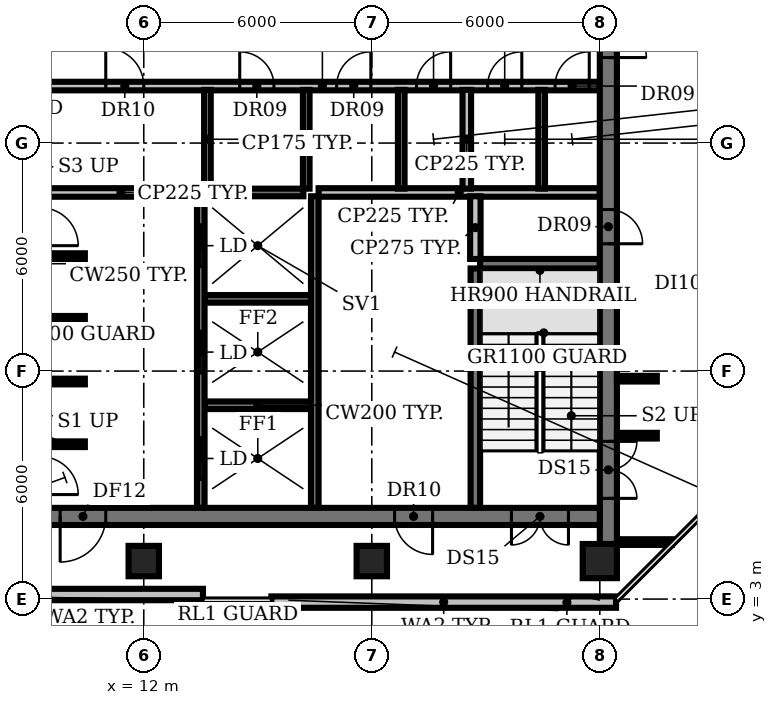
"""IFC4 building model, lengths in metres.
Left out: names, types, materials, properties, quantities, classifications, styles, units other than length and angle.
Written with IfcOpenShell. Run it as: python <this file> out.ifc"""

import sys

from ifc_helpers import new_model, si_unit, direction, frame, frame_2d, origin, origin_2d, place, context, subcontext, project, spatial, rectangle, circle, extrude, element, fill, save


model = new_model("IFC4")
c1 = context("Model", 3, precision=1e-05, world=origin(), true_north=direction((0.0, 1.0)))
c2 = subcontext(c1, "Body", "Model", "MODEL_VIEW")
j1 = project(units=[si_unit("LENGTHUNIT", "METRE"), si_unit("PLANEANGLEUNIT", "RADIAN")], contexts=[c1])
p1 = place(None, origin())
s1 = spatial("IfcSite", under=j1, at=p1, CompositionType="ELEMENT")
p2 = place(p1, origin())
s2 = spatial("IfcBuilding", under=s1, at=p2, CompositionType="ELEMENT")
p3 = place(p2, frame((0.0, 0.0, 239.0)))
s3 = spatial("IfcBuildingStorey", under=s2, at=p3, CompositionType="ELEMENT", Elevation=239.0)
for number, where, z_axis, x_axis in (
    (1, (12.0, 4.0, 0.0), (0.0, 0.0, 1.0), (1.0, 0.0, 0.0)),
    (2, (18.0, 4.0, 0.0), (0.0, 0.0, 1.0), (1.0, 0.0, 0.0)),
):
    element("IfcColumn", number, at=place(p3, frame(where, z_axis=z_axis, x_axis=x_axis)), inside=s3, PredefinedType="COLUMN", context=c2, shape_type="SweptSolid", body=[
        extrude(rectangle(XDim=0.8, YDim=0.8, at=origin_2d()), origin(), (0.0, 0.0, 1.0), 3.85),
    ])
p4 = place(p3, frame((24.0, 4.0, 0.0), z_axis=(0.0, 0.0, 1.0), x_axis=(1.0, 0.0, 0.0)))
e3 = element("IfcColumn", 3, at=p4, inside=s3, PredefinedType="COLUMN", context=c2, shape_type="SweptSolid", body=[
    extrude(circle(Radius=0.45, at=origin_2d()), origin(), (0.0, 0.0, 1.0), 3.85),
])
p5 = place(p3, frame((4.489, 3.12, 0.0), z_axis=(0.0, 0.0, 1.0), x_axis=(1.0, 0.0, 0.0)))
e4 = element("IfcWall", 4, at=p5, inside=s3, PredefinedType="SOLIDWALL", context=c2, shape_type="SweptSolid", body=[
    extrude(rectangle(XDim=9.069, YDim=0.3, at=frame_2d((4.535, 0.0))), origin(), (0.0, 0.0, 1.0), 3.85),
])
p6 = place(p3, frame((15.358, 2.92, 0.0), z_axis=(0.0, 0.0, 1.0), x_axis=(1.0, 0.0, 0.0)))
e5 = element("IfcWall", 5, at=p6, inside=s3, PredefinedType="SOLIDWALL", context=c2, shape_type="SweptSolid", body=[
    extrude(rectangle(XDim=9.069, YDim=0.3, at=frame_2d((4.534, 0.0))), origin(), (0.0, 0.0, 1.0), 3.85),
])
p7 = place(p3, frame((9.4, 7.075, 0.0), z_axis=(0.0, 0.0, 1.0), x_axis=(1.0, 0.0, 0.0)))
e6 = element("IfcWall", 6, at=p7, inside=s3, PredefinedType="SHEAR", context=c2, shape_type="SweptSolid", body=[
    extrude(rectangle(XDim=1.05, YDim=0.15, at=frame_2d((0.525, 0.0))), origin(), (0.0, 0.0, 1.0), 3.85),
])
p8 = place(p3, frame((13.6, 8.1, 0.0), z_axis=(0.0, 0.0, 1.0), x_axis=(1.0, 0.0, 0.0)))
e7 = element("IfcWall", 7, at=p8, inside=s3, PredefinedType="SHEAR", context=c2, shape_type="SweptSolid", body=[
    extrude(rectangle(XDim=2.8, YDim=0.2, at=frame_2d((1.4, 0.0))), origin(), (0.0, 0.0, 1.0), 3.85),
])
for number, where, z_axis, x_axis in (
    (8, (9.4, 8.725, 0.0), (0.0, 0.0, 1.0), (1.0, 0.0, 0.0)),
    (9, (9.4, 10.375, 0.0), (0.0, 0.0, 1.0), (1.0, 0.0, 0.0)),
):
    element("IfcWall", number, at=place(p3, frame(where, z_axis=z_axis, x_axis=x_axis)), inside=s3, PredefinedType="SHEAR", context=c2, shape_type="SweptSolid", body=[
        extrude(rectangle(XDim=1.05, YDim=0.15, at=frame_2d((0.525, 0.0))), origin(), (0.0, 0.0, 1.0), 3.85),
    ])
p9 = place(p3, frame((13.6, 10.9, 0.0), z_axis=(0.0, 0.0, 1.0), x_axis=(1.0, 0.0, 0.0)))
e10 = element("IfcWall", 10, at=p9, inside=s3, PredefinedType="SHEAR", context=c2, shape_type="SweptSolid", body=[
    extrude(rectangle(XDim=2.8, YDim=0.2, at=frame_2d((1.4, 0.0))), origin(), (0.0, 0.0, 1.0), 3.85),
])
p10 = place(p3, frame((20.85, 11.825, 0.0), z_axis=(0.0, 0.0, 1.0), x_axis=(1.0, 0.0, 0.0)))
e11 = element("IfcWall", 11, at=p10, inside=s3, PredefinedType="SHEAR", context=c2, shape_type="SweptSolid", body=[
    extrude(rectangle(XDim=3.15, YDim=0.25, at=frame_2d((1.575, 0.0))), origin(), (0.0, 0.0, 1.0), 3.85),
])
p11 = place(p3, frame((9.4, 12.025, 0.0), z_axis=(0.0, 0.0, 1.0), x_axis=(1.0, 0.0, 0.0)))
e12 = element("IfcWall", 12, at=p11, inside=s3, PredefinedType="SHEAR", context=c2, shape_type="SweptSolid", body=[
    extrude(rectangle(XDim=1.05, YDim=0.15, at=frame_2d((0.525, 0.0))), origin(), (0.0, 0.0, 1.0), 3.85),
])
p12 = place(p3, frame((9.4, 13.7, 0.0), z_axis=(0.0, 0.0, 1.0), x_axis=(1.0, 0.0, 0.0)))
e13 = element("IfcWall", 13, at=p12, inside=s3, PredefinedType="PARTITIONING", context=c2, shape_type="SweptSolid", body=[
    extrude(rectangle(XDim=4.0, YDim=0.225, at=frame_2d((2.0, 0.0))), origin(), (0.0, 0.0, 1.0), 3.85),
])
p13 = place(p3, frame((13.75, 13.7, 0.0), z_axis=(0.0, 0.0, 1.0), x_axis=(1.0, 0.0, 0.0)))
e14 = element("IfcWall", 14, at=p13, inside=s3, PredefinedType="SHEAR", context=c2, shape_type="SweptSolid", body=[
    extrude(rectangle(XDim=2.45, YDim=0.2, at=frame_2d((1.225, 0.0))), origin(), (0.0, 0.0, 1.0), 3.85),
])
p14 = place(p3, frame((16.6, 13.7, 0.0), z_axis=(0.0, 0.0, 1.0), x_axis=(1.0, 0.0, 0.0)))
e15 = element("IfcWall", 15, at=p14, inside=s3, PredefinedType="PARTITIONING", context=c2, shape_type="SweptSolid", body=[
    extrude(rectangle(XDim=7.4, YDim=0.225, at=frame_2d((3.7, 0.0))), origin(), (0.0, 0.0, 1.0), 3.85),
])
p15 = place(p3, frame((9.4, 16.5, 0.0), z_axis=(0.0, 0.0, 1.0), x_axis=(1.0, 0.0, 0.0)))
e16 = element("IfcWall", 16, at=p15, inside=s3, PredefinedType="PARTITIONING", context=c2, shape_type="SweptSolid", body=[
    extrude(rectangle(XDim=14.6, YDim=0.225, at=frame_2d((7.3, 0.0))), origin(), (0.0, 0.0, 1.0), 3.85),
])
p16 = place(p15, frame((1.6, 0.0, 0.0)))
e17 = element("IfcOpeningElement", 17, at=p16, cuts=e16, PredefinedType="OPENING", context=c2, shape_type="SweptSolid", body=[
    extrude(rectangle(XDim=1.0, YDim=2.1, at=frame_2d((0.5, 1.05))), frame((0.0, 0.123, 0.0), z_axis=(0.0, -1.0, 0.0), x_axis=(1.0, 0.0, 0.0)), (0.0, 0.0, 1.0), 0.245),
])
p17 = place(p15, frame((5.125, 0.0, 0.0)))
e18 = element("IfcOpeningElement", 18, at=p17, cuts=e16, PredefinedType="OPENING", context=c2, shape_type="SweptSolid", body=[
    extrude(rectangle(XDim=0.9, YDim=2.1, at=frame_2d((0.45, 1.05))), frame((0.0, 0.123, 0.0), z_axis=(0.0, -1.0, 0.0), x_axis=(1.0, 0.0, 0.0)), (0.0, 0.0, 1.0), 0.245),
])
p18 = place(p15, frame((7.675, 0.0, 0.0)))
e19 = element("IfcOpeningElement", 19, at=p18, cuts=e16, PredefinedType="OPENING", context=c2, shape_type="SweptSolid", body=[
    extrude(rectangle(XDim=0.9, YDim=2.1, at=frame_2d((0.45, 1.05))), frame((0.0, 0.123, 0.0), z_axis=(0.0, -1.0, 0.0), x_axis=(1.0, 0.0, 0.0)), (0.0, 0.0, 1.0), 0.245),
])
p19 = place(p15, frame((9.775, 0.0, 0.0)))
e20 = element("IfcOpeningElement", 20, at=p19, cuts=e16, PredefinedType="OPENING", context=c2, shape_type="SweptSolid", body=[
    extrude(rectangle(XDim=0.9, YDim=2.1, at=frame_2d((0.45, 1.05))), frame((0.0, 0.123, 0.0), z_axis=(0.0, -1.0, 0.0), x_axis=(1.0, 0.0, 0.0)), (0.0, 0.0, 1.0), 0.245),
])
p20 = place(p15, frame((11.647, 0.0, 0.0)))
e21 = element("IfcOpeningElement", 21, at=p20, cuts=e16, PredefinedType="OPENING", context=c2, shape_type="SweptSolid", body=[
    extrude(rectangle(XDim=0.9, YDim=2.1, at=frame_2d((0.45, 1.05))), frame((0.0, 0.123, 0.0), z_axis=(0.0, -1.0, 0.0), x_axis=(1.0, 0.0, 0.0)), (0.0, 0.0, 1.0), 0.245),
])
p21 = place(p15, frame((13.423, 0.0, 0.0)))
e22 = element("IfcOpeningElement", 22, at=p21, cuts=e16, PredefinedType="OPENING", context=c2, shape_type="SweptSolid", body=[
    extrude(rectangle(XDim=0.9, YDim=2.1, at=frame_2d((0.45, 1.05))), frame((0.0, 0.123, 0.0), z_axis=(0.0, -1.0, 0.0), x_axis=(1.0, 0.0, 0.0)), (0.0, 0.0, 1.0), 0.245),
])
p22 = place(p3, frame((13.5, 5.4, 0.0), z_axis=(0.0, 0.0, 1.0), x_axis=(0.0, 1.0, 0.0)))
e23 = element("IfcWall", 23, at=p22, inside=s3, PredefinedType="SHEAR", context=c2, shape_type="SweptSolid", body=[
    extrude(rectangle(XDim=8.2, YDim=0.2, at=frame_2d((4.1, 0.0))), origin(), (0.0, 0.0, 1.0), 3.85),
])
p23 = place(p22, frame((0.75, 0.0, 0.0)))
e24 = element("IfcOpeningElement", 24, at=p23, cuts=e23, PredefinedType="OPENING", context=c2, shape_type="SweptSolid", body=[
    extrude(rectangle(XDim=1.1, YDim=2.1, at=frame_2d((0.55, 1.05))), frame((0.0, 0.11, 0.0), z_axis=(0.0, -1.0, 0.0), x_axis=(1.0, 0.0, 0.0)), (0.0, 0.0, 1.0), 0.22),
])
p24 = place(p22, frame((3.55, 0.0, 0.0)))
e25 = element("IfcOpeningElement", 25, at=p24, cuts=e23, PredefinedType="OPENING", context=c2, shape_type="SweptSolid", body=[
    extrude(rectangle(XDim=1.1, YDim=2.1, at=frame_2d((0.55, 1.05))), frame((0.0, 0.11, 0.0), z_axis=(0.0, -1.0, 0.0), x_axis=(1.0, 0.0, 0.0)), (0.0, 0.0, 1.0), 0.22),
])
p25 = place(p22, frame((6.35, 0.0, 0.0)))
e26 = element("IfcOpeningElement", 26, at=p25, cuts=e23, PredefinedType="OPENING", context=c2, shape_type="SweptSolid", body=[
    extrude(rectangle(XDim=1.1, YDim=2.1, at=frame_2d((0.55, 1.05))), frame((0.0, 0.11, 0.0), z_axis=(0.0, -1.0, 0.0), x_axis=(1.0, 0.0, 0.0)), (0.0, 0.0, 1.0), 0.22),
])
for number, where, z_axis, x_axis in (
    (27, (13.675, 13.8, 0.0), (0.0, 0.0, 1.0), (0.0, 1.0, 0.0)),
    (28, (16.275, 13.8, 0.0), (0.0, 0.0, 1.0), (0.0, 1.0, 0.0)),
):
    element("IfcWall", number, at=place(p3, frame(where, z_axis=z_axis, x_axis=x_axis)), inside=s3, PredefinedType="PARTITIONING", context=c2, shape_type="SweptSolid", body=[
        extrude(rectangle(XDim=2.6, YDim=0.175, at=frame_2d((1.3, 0.0))), origin(), (0.0, 0.0, 1.0), 3.85),
    ])
p26 = place(p3, frame((16.5, 5.4, 0.0), z_axis=(0.0, 0.0, 1.0), x_axis=(0.0, 1.0, 0.0)))
e29 = element("IfcWall", 29, at=p26, inside=s3, PredefinedType="SHEAR", context=c2, shape_type="SweptSolid", body=[
    extrude(rectangle(XDim=8.2, YDim=0.2, at=frame_2d((4.1, 0.0))), origin(), (0.0, 0.0, 1.0), 3.85),
])
p27 = place(p3, frame((18.775, 13.8, 0.0), z_axis=(0.0, 0.0, 1.0), x_axis=(0.0, 1.0, 0.0)))
e30 = element("IfcWall", 30, at=p27, inside=s3, PredefinedType="PARTITIONING", context=c2, shape_type="SweptSolid", body=[
    extrude(rectangle(XDim=2.6, YDim=0.175, at=frame_2d((1.3, 0.0))), origin(), (0.0, 0.0, 1.0), 3.85),
])
p28 = place(p3, frame((20.5, 13.8, 0.0), z_axis=(0.0, 0.0, 1.0), x_axis=(0.0, 1.0, 0.0)))
e31 = element("IfcWall", 31, at=p28, inside=s3, PredefinedType="PARTITIONING", context=c2, shape_type="SweptSolid", body=[
    extrude(rectangle(XDim=2.6, YDim=0.225, at=frame_2d((1.3, 0.0))), origin(), (0.0, 0.0, 1.0), 3.85),
])
p29 = place(p3, frame((20.725, 5.4, 0.0), z_axis=(0.0, 0.0, 1.0), x_axis=(0.0, 1.0, 0.0)))
e32 = element("IfcWall", 32, at=p29, inside=s3, PredefinedType="SHEAR", context=c2, shape_type="SweptSolid", body=[
    extrude(rectangle(XDim=6.3, YDim=0.25, at=frame_2d((3.15, 0.0))), origin(), (0.0, 0.0, 1.0), 3.85),
])
p30 = place(p3, frame((20.725, 11.95, 0.0), z_axis=(0.0, 0.0, 1.0), x_axis=(0.0, 1.0, 0.0)))
e33 = element("IfcWall", 33, at=p30, inside=s3, PredefinedType="PARTITIONING", context=c2, shape_type="SweptSolid", body=[
    extrude(rectangle(XDim=1.65, YDim=0.275, at=frame_2d((0.825, 0.0))), origin(), (0.0, 0.0, 1.0), 3.85),
])
p31 = place(p3, frame((22.47, 13.8, 0.0), z_axis=(0.0, 0.0, 1.0), x_axis=(0.0, 1.0, 0.0)))
e34 = element("IfcWall", 34, at=p31, inside=s3, PredefinedType="PARTITIONING", context=c2, shape_type="SweptSolid", body=[
    extrude(rectangle(XDim=2.6, YDim=0.175, at=frame_2d((1.3, 0.0))), origin(), (0.0, 0.0, 1.0), 3.85),
])
p32 = place(p3, frame((24.225, 25.25, 0.0), z_axis=(0.0, 0.0, 1.0), x_axis=(0.0, -1.0, 0.0)))
e35 = element("IfcWall", 35, at=p32, inside=s3, PredefinedType="SHEAR", context=c2, shape_type="SweptSolid", body=[
    extrude(rectangle(XDim=20.83, YDim=0.45, at=frame_2d((10.415, 0.0))), origin(), (0.0, 0.0, 1.0), 3.85),
])
p33 = place(p32, frame((18.1, 0.0, 0.0)))
e36 = element("IfcOpeningElement", 36, at=p33, cuts=e35, PredefinedType="OPENING", context=c2, shape_type="SweptSolid", body=[
    extrude(rectangle(XDim=1.5, YDim=2.1, at=frame_2d((0.75, 1.05))), frame((0.0, 0.235, 0.0), z_axis=(0.0, -1.0, 0.0), x_axis=(1.0, 0.0, 0.0)), (0.0, 0.0, 1.0), 0.47),
])
p34 = place(p32, frame((12.0, 0.0, 0.0)))
e37 = element("IfcOpeningElement", 37, at=p34, cuts=e35, PredefinedType="OPENING", context=c2, shape_type="SweptSolid", body=[
    extrude(rectangle(XDim=0.9, YDim=2.1, at=frame_2d((0.45, 1.05))), frame((0.0, 0.235, 0.0), z_axis=(0.0, -1.0, 0.0), x_axis=(1.0, 0.0, 0.0)), (0.0, 0.0, 1.0), 0.47),
])
p35 = place(p32, frame((6.0, 0.0, 0.0)))
e38 = element("IfcOpeningElement", 38, at=p35, cuts=e35, PredefinedType="OPENING", context=c2, shape_type="SweptSolid", body=[
    extrude(rectangle(XDim=2.0, YDim=2.1, at=frame_2d((1.0, 1.05))), frame((0.0, 0.235, 0.0), z_axis=(0.0, -1.0, 0.0), x_axis=(1.0, 0.0, 0.0)), (0.0, 0.0, 1.0), 0.47),
])
p36 = place(p3, frame((24.0, 5.175, 0.0), z_axis=(0.0, 0.0, 1.0), x_axis=(-1.0, 0.0, 0.0)))
e39 = element("IfcWall", 39, at=p36, inside=s3, PredefinedType="SHEAR", context=c2, shape_type="SweptSolid", body=[
    extrude(rectangle(XDim=18.0, YDim=0.45, at=frame_2d((9.0, 0.0))), origin(), (0.0, 0.0, 1.0), 3.85),
])
p37 = place(p36, frame((0.825, 0.0, 0.0)))
e40 = element("IfcOpeningElement", 40, at=p37, cuts=e39, PredefinedType="OPENING", context=c2, shape_type="SweptSolid", body=[
    extrude(rectangle(XDim=1.5, YDim=2.1, at=frame_2d((0.75, 1.05))), frame((0.0, 0.235, 0.0), z_axis=(0.0, -1.0, 0.0), x_axis=(1.0, 0.0, 0.0)), (0.0, 0.0, 1.0), 0.47),
])
p38 = place(p36, frame((15.675, 0.0, 0.0)))
e41 = element("IfcOpeningElement", 41, at=p38, cuts=e39, PredefinedType="OPENING", context=c2, shape_type="SweptSolid", body=[
    extrude(rectangle(XDim=1.5, YDim=2.1, at=frame_2d((0.75, 1.05))), frame((0.0, 0.235, 0.0), z_axis=(0.0, -1.0, 0.0), x_axis=(1.0, 0.0, 0.0)), (0.0, 0.0, 1.0), 0.47),
])
p39 = place(p36, frame((13.0, 0.0, 0.0)))
e42 = element("IfcOpeningElement", 42, at=p39, cuts=e39, PredefinedType="OPENING", context=c2, shape_type="SweptSolid", body=[
    extrude(rectangle(XDim=1.2, YDim=2.1, at=frame_2d((0.6, 1.05))), frame((0.0, 0.235, 0.0), z_axis=(0.0, -1.0, 0.0), x_axis=(1.0, 0.0, 0.0)), (0.0, 0.0, 1.0), 0.47),
])
p40 = place(p36, frame((4.4, 0.0, 0.0)))
e43 = element("IfcOpeningElement", 43, at=p40, cuts=e39, PredefinedType="OPENING", context=c2, shape_type="SweptSolid", body=[
    extrude(rectangle(XDim=1.0, YDim=2.1, at=frame_2d((0.5, 1.05))), frame((0.0, 0.235, 0.0), z_axis=(0.0, -1.0, 0.0), x_axis=(1.0, 0.0, 0.0)), (0.0, 0.0, 1.0), 0.47),
])
for number, where, z_axis, x_axis in (
    (44, (24.45, 7.3, 0.0), (0.0, 0.0, 1.0), (1.0, 0.0, 0.0)),
    (45, (24.45, 8.8, 0.0), (0.0, 0.0, 1.0), (1.0, 0.0, 0.0)),
):
    element("IfcWall", number, at=place(p3, frame(where, z_axis=z_axis, x_axis=x_axis)), inside=s3, PredefinedType="PARTITIONING", context=c2, shape_type="SweptSolid", body=[
        extrude(rectangle(XDim=1.05, YDim=0.15, at=frame_2d((0.525, 0.0))), origin(), (0.0, 0.0, 1.0), 2.88),
    ])
p41 = place(p3, frame((24.55, 4.5, 0.0), z_axis=(0.0, 0.0, 1.0), x_axis=(1.0, 0.0, 0.0)))
e46 = element("IfcWall", 46, at=p41, inside=s3, PredefinedType="PARTITIONING", context=c2, shape_type="SweptSolid", body=[
    extrude(rectangle(XDim=1.34, YDim=0.15, at=frame_2d((0.67, 0.0))), origin(), (0.0, 0.0, 1.0), 2.88),
])
p42 = place(p16, origin())
e47 = element("IfcDoor", 47, at=p42, inside=s3, OperationType="SINGLE_SWING_LEFT", PredefinedType="DOOR", context=c2, shape_type="SweptSolid", body=[
    extrude(rectangle(XDim=1.0, YDim=2.1, at=frame_2d((0.5, 1.05))), frame((0.0, 0.025, 0.0), z_axis=(0.0, -1.0, 0.0), x_axis=(1.0, 0.0, 0.0)), (0.0, 0.0, 1.0), 0.05),
])
fill(e17, e47)
p43 = place(p17, origin())
e48 = element("IfcDoor", 48, at=p43, inside=s3, OperationType="SINGLE_SWING_LEFT", PredefinedType="DOOR", context=c2, shape_type="SweptSolid", body=[
    extrude(rectangle(XDim=0.9, YDim=2.1, at=frame_2d((0.45, 1.05))), frame((0.0, 0.025, 0.0), z_axis=(0.0, -1.0, 0.0), x_axis=(1.0, 0.0, 0.0)), (0.0, 0.0, 1.0), 0.05),
])
fill(e18, e48)
p44 = place(p18, origin())
e49 = element("IfcDoor", 49, at=p44, inside=s3, OperationType="SINGLE_SWING_RIGHT", PredefinedType="DOOR", context=c2, shape_type="SweptSolid", body=[
    extrude(rectangle(XDim=0.9, YDim=2.1, at=frame_2d((0.45, 1.05))), frame((0.0, 0.025, 0.0), z_axis=(0.0, -1.0, 0.0), x_axis=(1.0, 0.0, 0.0)), (0.0, 0.0, 1.0), 0.05),
])
fill(e19, e49)
p45 = place(p19, origin())
e50 = element("IfcDoor", 50, at=p45, inside=s3, OperationType="SINGLE_SWING_RIGHT", PredefinedType="DOOR", context=c2, shape_type="SweptSolid", body=[
    extrude(rectangle(XDim=0.9, YDim=2.1, at=frame_2d((0.45, 1.05))), frame((0.0, 0.025, 0.0), z_axis=(0.0, -1.0, 0.0), x_axis=(1.0, 0.0, 0.0)), (0.0, 0.0, 1.0), 0.05),
])
fill(e20, e50)
p46 = place(p20, origin())
e51 = element("IfcDoor", 51, at=p46, inside=s3, OperationType="SINGLE_SWING_RIGHT", PredefinedType="DOOR", context=c2, shape_type="SweptSolid", body=[
    extrude(rectangle(XDim=0.9, YDim=2.1, at=frame_2d((0.45, 1.05))), frame((0.0, 0.025, 0.0), z_axis=(0.0, -1.0, 0.0), x_axis=(1.0, 0.0, 0.0)), (0.0, 0.0, 1.0), 0.05),
])
fill(e21, e51)
p47 = place(p21, origin())
e52 = element("IfcDoor", 52, at=p47, inside=s3, OperationType="SINGLE_SWING_RIGHT", PredefinedType="DOOR", context=c2, shape_type="SweptSolid", body=[
    extrude(rectangle(XDim=0.9, YDim=2.1, at=frame_2d((0.45, 1.05))), frame((0.0, 0.025, 0.0), z_axis=(0.0, -1.0, 0.0), x_axis=(1.0, 0.0, 0.0)), (0.0, 0.0, 1.0), 0.05),
])
fill(e22, e52)
p48 = place(p23, origin())
e53 = element("IfcDoor", 53, at=p48, inside=s3, OperationType="DOUBLE_DOOR_SLIDING", PredefinedType="DOOR", context=c2, shape_type="SweptSolid", body=[
    extrude(rectangle(XDim=1.1, YDim=2.1, at=frame_2d((0.55, 1.05))), frame((0.0, 0.025, 0.0), z_axis=(0.0, -1.0, 0.0), x_axis=(1.0, 0.0, 0.0)), (0.0, 0.0, 1.0), 0.05),
])
fill(e24, e53)
p49 = place(p24, origin())
e54 = element("IfcDoor", 54, at=p49, inside=s3, OperationType="DOUBLE_DOOR_SLIDING", PredefinedType="DOOR", context=c2, shape_type="SweptSolid", body=[
    extrude(rectangle(XDim=1.1, YDim=2.1, at=frame_2d((0.55, 1.05))), frame((0.0, 0.025, 0.0), z_axis=(0.0, -1.0, 0.0), x_axis=(1.0, 0.0, 0.0)), (0.0, 0.0, 1.0), 0.05),
])
fill(e25, e54)
p50 = place(p25, origin())
e55 = element("IfcDoor", 55, at=p50, inside=s3, OperationType="DOUBLE_DOOR_SLIDING", PredefinedType="DOOR", context=c2, shape_type="SweptSolid", body=[
    extrude(rectangle(XDim=1.1, YDim=2.1, at=frame_2d((0.55, 1.05))), frame((0.0, 0.025, 0.0), z_axis=(0.0, -1.0, 0.0), x_axis=(1.0, 0.0, 0.0)), (0.0, 0.0, 1.0), 0.05),
])
fill(e26, e55)
p51 = place(p33, origin())
e56 = element("IfcDoor", 56, at=p51, inside=s3, OperationType="DOUBLE_DOOR_SINGLE_SWING", PredefinedType="DOOR", context=c2, shape_type="SweptSolid", body=[
    extrude(rectangle(XDim=1.5, YDim=2.1, at=frame_2d((0.75, 1.05))), frame((0.0, 0.025, 0.0), z_axis=(0.0, -1.0, 0.0), x_axis=(1.0, 0.0, 0.0)), (0.0, 0.0, 1.0), 0.05),
])
fill(e36, e56)
p52 = place(p34, origin())
e57 = element("IfcDoor", 57, at=p52, inside=s3, OperationType="SINGLE_SWING_RIGHT", PredefinedType="DOOR", context=c2, shape_type="SweptSolid", body=[
    extrude(rectangle(XDim=0.9, YDim=2.1, at=frame_2d((0.45, 1.05))), frame((0.0, 0.025, 0.0), z_axis=(0.0, -1.0, 0.0), x_axis=(1.0, 0.0, 0.0)), (0.0, 0.0, 1.0), 0.05),
])
fill(e37, e57)
p53 = place(p35, origin())
e58 = element("IfcDoor", 58, at=p53, inside=s3, OperationType="DOUBLE_DOOR_SINGLE_SWING", PredefinedType="DOOR", context=c2, shape_type="SweptSolid", body=[
    extrude(rectangle(XDim=2.0, YDim=2.1, at=frame_2d((1.0, 1.05))), frame((0.0, 0.025, 0.0), z_axis=(0.0, -1.0, 0.0), x_axis=(1.0, 0.0, 0.0)), (0.0, 0.0, 1.0), 0.05),
])
fill(e38, e58)
p54 = place(p37, origin())
e59 = element("IfcDoor", 59, at=p54, inside=s3, OperationType="DOUBLE_DOOR_SINGLE_SWING", PredefinedType="DOOR", context=c2, shape_type="SweptSolid", body=[
    extrude(rectangle(XDim=1.5, YDim=2.1, at=frame_2d((0.75, 1.05))), frame((0.0, 0.025, 0.0), z_axis=(0.0, -1.0, 0.0), x_axis=(1.0, 0.0, 0.0)), (0.0, 0.0, 1.0), 0.05),
])
fill(e40, e59)
p55 = place(p39, origin())
e60 = element("IfcDoor", 60, at=p55, inside=s3, OperationType="SINGLE_SWING_RIGHT", PredefinedType="DOOR", context=c2, shape_type="SweptSolid", body=[
    extrude(rectangle(XDim=1.2, YDim=2.1, at=frame_2d((0.6, 1.05))), frame((0.0, 0.025, 0.0), z_axis=(0.0, -1.0, 0.0), x_axis=(1.0, 0.0, 0.0)), (0.0, 0.0, 1.0), 0.05),
])
fill(e42, e60)
p56 = place(p40, origin())
e61 = element("IfcDoor", 61, at=p56, inside=s3, OperationType="SINGLE_SWING_LEFT", PredefinedType="DOOR", context=c2, shape_type="SweptSolid", body=[
    extrude(rectangle(XDim=1.0, YDim=2.1, at=frame_2d((0.5, 1.05))), frame((0.0, 0.025, 0.0), z_axis=(0.0, -1.0, 0.0), x_axis=(1.0, 0.0, 0.0)), (0.0, 0.0, 1.0), 0.05),
])
fill(e43, e61)
save(model, sys.argv[1])
